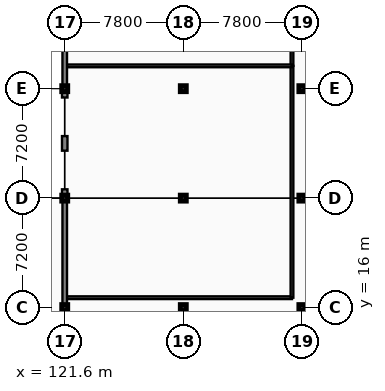
"""IFC4 building model, lengths in metres.
Left out: names, types, materials, properties, quantities, classifications, styles, units other than length and angle.
Written with IfcOpenShell. Run it as: python <this file> out.ifc"""

import sys

from ifc_helpers import new_model, si_unit, direction, frame, frame_2d, origin, origin_2d, place, context, subcontext, project, spatial, rectangle, extrude, element, fill, save


model = new_model("IFC4")
c1 = context("Model", 3, precision=1e-05, world=origin(), true_north=direction((0.0, 1.0)))
c2 = subcontext(c1, "Body", "Model", "MODEL_VIEW")
j1 = project(units=[si_unit("LENGTHUNIT", "METRE"), si_unit("PLANEANGLEUNIT", "RADIAN")], contexts=[c1])
p1 = place(None, origin())
s1 = spatial("IfcSite", under=j1, at=p1, CompositionType="ELEMENT")
p2 = place(p1, origin())
s2 = spatial("IfcBuilding", under=s1, at=p2, CompositionType="ELEMENT")
p3 = place(p2, frame((0.0, 0.0, 5.4)))
s3 = spatial("IfcBuildingStorey", under=s2, at=p3, CompositionType="ELEMENT", Elevation=5.4)
for number, where, z_axis, x_axis in (
    (1, (121.6, 16.0, 0.0), (0.0, 0.0, 1.0), (1.0, 0.0, 0.0)),
    (2, (121.6, 23.2, 0.0), (0.0, 0.0, 1.0), (1.0, 0.0, 0.0)),
    (3, (121.6, 30.4, 0.0), (0.0, 0.0, 1.0), (1.0, 0.0, 0.0)),
    (4, (129.4, 16.0, 0.0), (0.0, 0.0, 1.0), (1.0, 0.0, 0.0)),
    (5, (129.4, 23.2, 0.0), (0.0, 0.0, 1.0), (1.0, 0.0, 0.0)),
    (6, (129.4, 30.4, 0.0), (0.0, 0.0, 1.0), (1.0, 0.0, 0.0)),
    (7, (137.2, 16.0, 0.0), (0.0, 0.0, 1.0), (1.0, 0.0, 0.0)),
    (8, (137.2, 23.2, 0.0), (0.0, 0.0, 1.0), (1.0, 0.0, 0.0)),
    (9, (137.2, 30.4, 0.0), (0.0, 0.0, 1.0), (1.0, 0.0, 0.0)),
):
    element("IfcColumn", number, at=place(p3, frame(where, z_axis=z_axis, x_axis=x_axis)), inside=s3, PredefinedType="COLUMN", context=c2, shape_type="SweptSolid", body=[
        extrude(rectangle(XDim=0.4, YDim=0.4, at=origin_2d()), origin(), (0.0, 0.0, 1.0), 4.2),
    ])
p4 = place(p3, frame((121.74, 16.65, 0.0), z_axis=(0.0, 0.0, 1.0), x_axis=(1.0, 0.0, 0.0)))
e10 = element("IfcWall", 10, at=p4, inside=s3, PredefinedType="PARTITIONING", context=c2, shape_type="SweptSolid", body=[
    extrude(rectangle(XDim=14.81, YDim=0.18, at=frame_2d((7.405, 0.0))), origin(), (0.0, 0.0, 1.0), 3.21),
])
p5 = place(p4, frame((4.419, 0.0, -0.01)))
e11 = element("IfcOpeningElement", 11, at=p5, cuts=e10, PredefinedType="OPENING", context=c2, shape_type="SweptSolid", body=[
    extrude(rectangle(XDim=1.0, YDim=2.16, at=frame_2d((0.5, 1.08))), frame((0.0, 0.1, 0.0), z_axis=(0.0, -1.0, 0.0), x_axis=(1.0, 0.0, 0.0)), (0.0, 0.0, 1.0), 0.2),
])
p6 = place(p3, frame((136.55, 16.65, 0.0), z_axis=(0.0, 0.0, 1.0), x_axis=(0.0, 1.0, 0.0)))
e12 = element("IfcWall", 12, at=p6, inside=s3, PredefinedType="PARTITIONING", context=c2, shape_type="SweptSolid", body=[
    extrude(rectangle(XDim=15.25, YDim=0.18, at=frame_2d((7.625, 0.0))), origin(), (0.0, 0.0, 1.0), 3.67),
])
p7 = place(p6, frame((4.56, 0.0, -0.01)))
e13 = element("IfcOpeningElement", 13, at=p7, cuts=e12, PredefinedType="OPENING", context=c2, shape_type="SweptSolid", body=[
    extrude(rectangle(XDim=1.0, YDim=2.16, at=frame_2d((0.5, 1.08))), frame((0.0, 0.1, 0.0), z_axis=(0.0, -1.0, 0.0), x_axis=(1.0, 0.0, 0.0)), (0.0, 0.0, 1.0), 0.2),
])
p8 = place(p3, frame((136.55, 31.9, 0.0), z_axis=(0.0, 0.0, 1.0), x_axis=(0.0, 1.0, 0.0)))
e14 = element("IfcWall", 14, at=p8, inside=s3, PredefinedType="PARTITIONING", context=c2, shape_type="SweptSolid", body=[
    extrude(rectangle(XDim=10.36, YDim=0.18, at=frame_2d((5.18, 0.0))), origin(), (0.0, 0.0, 1.0), 3.67),
])
p9 = place(p8, frame((2.995, 0.0, -0.01)))
e15 = element("IfcOpeningElement", 15, at=p9, cuts=e14, PredefinedType="OPENING", context=c2, shape_type="SweptSolid", body=[
    extrude(rectangle(XDim=1.0, YDim=2.16, at=frame_2d((0.5, 1.08))), frame((0.0, 0.1, 0.0), z_axis=(0.0, -1.0, 0.0), x_axis=(1.0, 0.0, 0.0)), (0.0, 0.0, 1.0), 0.2),
])
p10 = place(p3, frame((121.74, 31.9, 0.0), z_axis=(0.0, 0.0, 1.0), x_axis=(1.0, 0.0, 0.0)))
e16 = element("IfcWall", 16, at=p10, inside=s3, PredefinedType="PARTITIONING", context=c2, shape_type="SweptSolid", body=[
    extrude(rectangle(XDim=14.81, YDim=0.18, at=frame_2d((7.405, 0.0))), origin(), (0.0, 0.0, 1.0), 3.59),
])
p11 = place(p3, frame((121.6, 15.87, 0.0), z_axis=(0.0, 0.0, 1.0), x_axis=(0.0, -1.0, 0.0)))
e17 = element("IfcWall", 17, at=p11, inside=s3, PredefinedType="SOLIDWALL", context=c2, shape_type="SweptSolid", body=[
    extrude(rectangle(XDim=0.45, YDim=0.36, at=frame_2d((0.225, 0.0))), origin(), (0.0, 0.0, 1.0), 3.21),
])
p12 = place(p3, frame((121.6, 23.2, 0.0), z_axis=(0.0, 0.0, 1.0), x_axis=(0.0, -1.0, 0.0)))
e18 = element("IfcWall", 18, at=p12, inside=s3, PredefinedType="SOLIDWALL", context=c2, shape_type="SweptSolid", body=[
    extrude(rectangle(XDim=7.2, YDim=0.3, at=frame_2d((3.6, 0.0))), origin(), (0.0, 0.0, 1.0), 3.21),
])
p13 = place(p12, frame((3.0, 0.0, -0.01)))
e19 = element("IfcOpeningElement", 19, at=p13, cuts=e18, PredefinedType="OPENING", context=c2, shape_type="SweptSolid", body=[
    extrude(rectangle(XDim=1.2, YDim=2.21, at=frame_2d((0.6, 1.105))), frame((0.0, 0.16, 0.0), z_axis=(0.0, -1.0, 0.0), x_axis=(1.0, 0.0, 0.0)), (0.0, 0.0, 1.0), 0.32),
])
p14 = place(p3, frame((121.6, 27.28, 0.0), z_axis=(0.0, 0.0, 1.0), x_axis=(0.0, -1.0, 0.0)))
e20 = element("IfcWall", 20, at=p14, inside=s3, PredefinedType="SOLIDWALL", context=c2, shape_type="SweptSolid", body=[
    extrude(rectangle(XDim=0.96, YDim=0.36, at=frame_2d((0.48, 0.0))), origin(), (0.0, 0.0, 1.0), 3.21),
])
for number, where, z_axis, x_axis in (
    (21, (121.6, 30.27, 0.0), (0.0, 0.0, 1.0), (0.0, -1.0, 0.0)),
    (22, (121.6, 23.78, 0.0), (0.0, 0.0, 1.0), (0.0, -1.0, 0.0)),
):
    element("IfcWall", number, at=place(p3, frame(where, z_axis=z_axis, x_axis=x_axis)), inside=s3, PredefinedType="SOLIDWALL", context=c2, shape_type="SweptSolid", body=[
        extrude(rectangle(XDim=0.45, YDim=0.36, at=frame_2d((0.225, 0.0))), origin(), (0.0, 0.0, 1.0), 3.21),
    ])
p15 = place(p3, frame((121.6, 37.6, 0.0), z_axis=(0.0, 0.0, 1.0), x_axis=(0.0, -1.0, 0.0)))
e23 = element("IfcWall", 23, at=p15, inside=s3, PredefinedType="SOLIDWALL", context=c2, shape_type="SweptSolid", body=[
    extrude(rectangle(XDim=7.2, YDim=0.3, at=frame_2d((3.6, 0.0))), origin(), (0.0, 0.0, 1.0), 3.59),
])
p16 = place(p15, frame((0.46, 0.0, 0.9)))
e24 = element("IfcOpeningElement", 24, at=p16, cuts=e23, PredefinedType="OPENING", context=c2, shape_type="SweptSolid", body=[
    extrude(rectangle(XDim=1.8, YDim=2.25, at=frame_2d((0.9, 1.125))), frame((0.0, 0.16, 0.0), z_axis=(0.0, -1.0, 0.0), x_axis=(1.0, 0.0, 0.0)), (0.0, 0.0, 1.0), 0.32),
])
p17 = place(p15, frame((3.66, 0.0, 0.9)))
e25 = element("IfcOpeningElement", 25, at=p17, cuts=e23, PredefinedType="OPENING", context=c2, shape_type="SweptSolid", body=[
    extrude(rectangle(XDim=1.8, YDim=2.25, at=frame_2d((0.9, 1.125))), frame((0.0, 0.16, 0.0), z_axis=(0.0, -1.0, 0.0), x_axis=(1.0, 0.0, 0.0)), (0.0, 0.0, 1.0), 0.32),
])
p18 = place(p5, frame((0.0, 0.0, 0.01)))
e26 = element("IfcDoor", 26, at=p18, inside=s3, OperationType="SINGLE_SWING_LEFT", PredefinedType="DOOR", context=c2, shape_type="SweptSolid", body=[
    extrude(rectangle(XDim=1.0, YDim=2.15, at=frame_2d((0.5, 1.075))), frame((0.0, 0.025, 0.0), z_axis=(0.0, -1.0, 0.0), x_axis=(1.0, 0.0, 0.0)), (0.0, 0.0, 1.0), 0.05),
])
fill(e11, e26)
p19 = place(p7, frame((1.0, 0.0, 0.01), z_axis=(0.0, 0.0, 1.0), x_axis=(-1.0, 0.0, 0.0)))
e27 = element("IfcDoor", 27, at=p19, inside=s3, OperationType="SINGLE_SWING_RIGHT", PredefinedType="DOOR", context=c2, shape_type="SweptSolid", body=[
    extrude(rectangle(XDim=1.0, YDim=2.15, at=frame_2d((0.5, 1.075))), frame((0.0, 0.025, 0.0), z_axis=(0.0, -1.0, 0.0), x_axis=(1.0, 0.0, 0.0)), (0.0, 0.0, 1.0), 0.05),
])
fill(e13, e27)
p20 = place(p13, frame((0.0, 0.0, 0.01)))
e28 = element("IfcDoor", 28, at=p20, inside=s3, OperationType="SINGLE_SWING_LEFT", PredefinedType="DOOR", context=c2, shape_type="SweptSolid", body=[
    extrude(rectangle(XDim=1.2, YDim=2.2, at=frame_2d((0.6, 1.1))), frame((0.0, 0.025, 0.0), z_axis=(0.0, -1.0, 0.0), x_axis=(1.0, 0.0, 0.0)), (0.0, 0.0, 1.0), 0.05),
])
fill(e19, e28)
p21 = place(p17, origin())
e29 = element("IfcWindow", 29, at=p21, inside=s3, PartitioningType="DOUBLE_PANEL_VERTICAL", PredefinedType="WINDOW", context=c2, shape_type="SweptSolid", body=[
    extrude(rectangle(XDim=1.8, YDim=2.25, at=frame_2d((0.9, 1.125))), frame((0.0, 0.03, 0.0), z_axis=(0.0, -1.0, 0.0), x_axis=(1.0, 0.0, 0.0)), (0.0, 0.0, 1.0), 0.06),
])
fill(e25, e29)
save(model, sys.argv[1])
